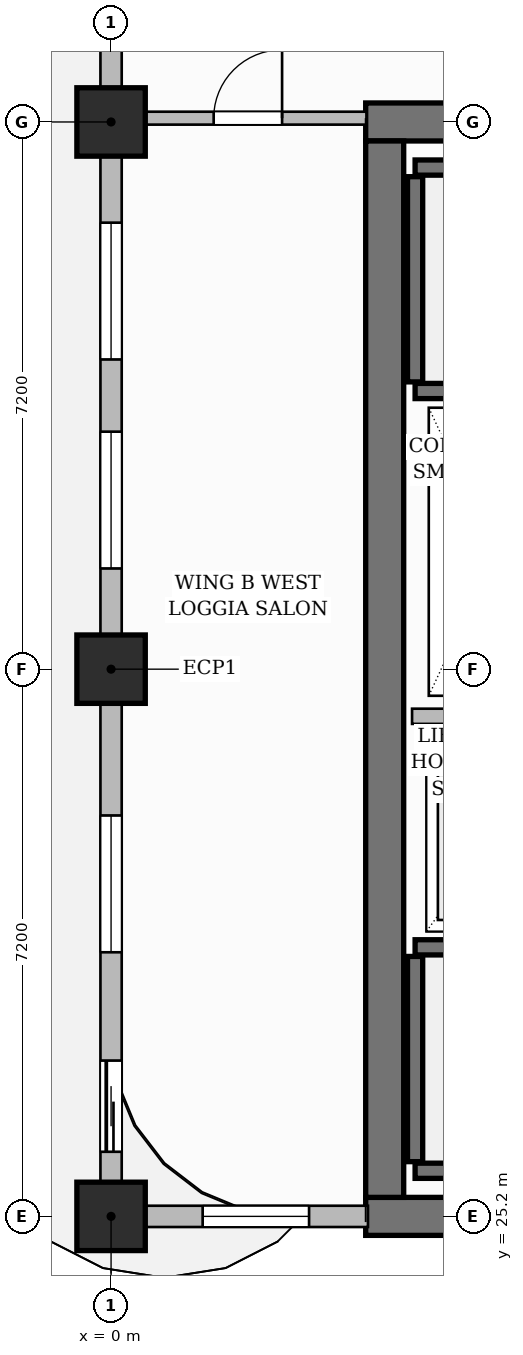
"""IFC4 building model, lengths in metres.
Left out: names, types, materials, properties, quantities, classifications, styles, units other than length and angle.
Written with IfcOpenShell. Run it as: python <this file> out.ifc"""

import sys

from ifc_helpers import new_model, si_unit, direction, frame, frame_2d, origin, origin_2d, place, context, subcontext, project, spatial, rectangle, extrude, source, transform, mapped, element, fill, save


model = new_model("IFC4")
c1 = context("Model", 3, precision=1e-05, world=origin(), true_north=direction((0.0, 1.0)))
c2 = subcontext(c1, "Body", "Model", "MODEL_VIEW")
j1 = project(units=[si_unit("LENGTHUNIT", "METRE"), si_unit("PLANEANGLEUNIT", "RADIAN")], contexts=[c1])
p1 = place(None, origin())
s1 = spatial("IfcSite", under=j1, at=p1, CompositionType="ELEMENT")
p2 = place(p1, origin())
s2 = spatial("IfcBuilding", under=s1, at=p2, CompositionType="ELEMENT")
p3 = place(p2, frame((0.0, 0.0, 205.75)))
s3 = spatial("IfcBuildingStorey", under=s2, at=p3, CompositionType="ELEMENT", Elevation=205.75)
for number, where, z_axis, x_axis in (
    (1, (3.35, 25.2, 0.0), (0.0, 0.0, 1.0), (1.0, 0.0, 0.0)),
    (2, (3.35, 39.6, 0.0), (0.0, 0.0, 1.0), (1.0, 0.0, 0.0)),
):
    element("IfcWall", number, at=place(p3, frame(where, z_axis=z_axis, x_axis=x_axis)), inside=s3, PredefinedType="SHEAR", context=c2, shape_type="SweptSolid", body=[
        extrude(rectangle(XDim=8.3, YDim=0.5, at=frame_2d((4.15, 0.0))), origin(), (0.0, 0.0, 1.0), 3.85),
    ])
p4 = place(p3, frame((3.6, 25.45, 0.0), z_axis=(0.0, 0.0, 1.0), x_axis=(0.0, 1.0, 0.0)))
e3 = element("IfcWall", 3, at=p4, inside=s3, PredefinedType="SHEAR", context=c2, shape_type="SweptSolid", body=[
    extrude(rectangle(XDim=13.9, YDim=0.5, at=frame_2d((6.95, 0.0))), origin(), (0.0, 0.0, 1.0), 3.85),
])
m1 = source(origin(), c2, "Body", "SweptSolid", [
    extrude(rectangle(XDim=0.9, YDim=0.9, at=origin_2d()), origin(), (0.0, 0.0, 1.0), 3.85),
])
for number, where, z_axis, x_axis in (
    (4, (0.0, 25.2, 0.0), (0.0, 0.0, 1.0), (1.0, 0.0, 0.0)),
    (5, (0.0, 32.4, 0.0), (0.0, 0.0, 1.0), (1.0, 0.0, 0.0)),
    (6, (0.0, 39.6, 0.0), (0.0, 0.0, 1.0), (1.0, 0.0, 0.0)),
):
    element("IfcColumn", number, at=place(p3, frame(where, z_axis=z_axis, x_axis=x_axis)), inside=s3, PredefinedType="COLUMN", context=c2, shape_type="MappedRepresentation", body=[
        mapped(m1, transform((0.0, 0.0, 0.0), scale=1.0)),
    ])
p5 = place(p3, frame((4.0, 25.8, 0.0), z_axis=(0.0, 0.0, 1.0), x_axis=(1.0, 0.0, 0.0)))
e7 = element("IfcWall", 7, at=p5, inside=s3, PredefinedType="SHEAR", context=c2, shape_type="SweptSolid", body=[
    extrude(rectangle(XDim=7.1, YDim=0.2, at=frame_2d((3.55, 0.0))), origin(), (0.0, 0.0, 1.0), 3.85),
])
p6 = place(p3, frame((4.0, 25.92, 0.0), z_axis=(0.0, 0.0, 1.0), x_axis=(0.0, 1.0, 0.0)))
e8 = element("IfcWall", 8, at=p6, inside=s3, PredefinedType="SHEAR", context=c2, shape_type="SweptSolid", body=[
    extrude(rectangle(XDim=2.7, YDim=0.2, at=frame_2d((1.35, 0.0))), origin(), (0.0, 0.0, 1.0), 3.85),
])
p7 = place(p3, frame((4.0, 28.74, 0.0), z_axis=(0.0, 0.0, 1.0), x_axis=(1.0, 0.0, 0.0)))
e9 = element("IfcWall", 9, at=p7, inside=s3, PredefinedType="SHEAR", context=c2, shape_type="SweptSolid", body=[
    extrude(rectangle(XDim=7.1, YDim=0.2, at=frame_2d((3.55, 0.0))), origin(), (0.0, 0.0, 1.0), 3.85),
])
p8 = place(p7, frame((5.815, 0.0, 0.0)))
e10 = element("IfcOpeningElement", 10, at=p8, cuts=e9, PredefinedType="OPENING", context=c2, shape_type="SweptSolid", body=[
    extrude(rectangle(XDim=1.05, YDim=2.2, at=frame_2d((0.525, 1.1))), frame((0.0, 0.11, 0.0), z_axis=(0.0, -1.0, 0.0), x_axis=(1.0, 0.0, 0.0)), (0.0, 0.0, 1.0), 0.22),
])
p9 = place(p3, frame((4.0, 39.0, 0.0), z_axis=(0.0, 0.0, 1.0), x_axis=(1.0, 0.0, 0.0)))
e11 = element("IfcWall", 11, at=p9, inside=s3, PredefinedType="SHEAR", context=c2, shape_type="SweptSolid", body=[
    extrude(rectangle(XDim=7.1, YDim=0.2, at=frame_2d((3.55, 0.0))), origin(), (0.0, 0.0, 1.0), 3.85),
])
p10 = place(p3, frame((4.0, 36.18, 0.0), z_axis=(0.0, 0.0, 1.0), x_axis=(0.0, 1.0, 0.0)))
e12 = element("IfcWall", 12, at=p10, inside=s3, PredefinedType="SHEAR", context=c2, shape_type="SweptSolid", body=[
    extrude(rectangle(XDim=2.7, YDim=0.2, at=frame_2d((1.35, 0.0))), origin(), (0.0, 0.0, 1.0), 3.85),
])
p11 = place(p3, frame((4.0, 36.06, 0.0), z_axis=(0.0, 0.0, 1.0), x_axis=(1.0, 0.0, 0.0)))
e13 = element("IfcWall", 13, at=p11, inside=s3, PredefinedType="SHEAR", context=c2, shape_type="SweptSolid", body=[
    extrude(rectangle(XDim=7.1, YDim=0.2, at=frame_2d((3.55, 0.0))), origin(), (0.0, 0.0, 1.0), 3.85),
])
p12 = place(p11, frame((5.815, 0.0, 0.0)))
e14 = element("IfcOpeningElement", 14, at=p12, cuts=e13, PredefinedType="OPENING", context=c2, shape_type="SweptSolid", body=[
    extrude(rectangle(XDim=1.05, YDim=2.2, at=frame_2d((0.525, 1.1))), frame((0.0, 0.11, 0.0), z_axis=(0.0, -1.0, 0.0), x_axis=(1.0, 0.0, 0.0)), (0.0, 0.0, 1.0), 0.22),
])
p13 = place(p3, frame((3.96, 31.78, 0.0), z_axis=(0.0, 0.0, 1.0), x_axis=(1.0, 0.0, 0.0)))
e15 = element("IfcWall", 15, at=p13, inside=s3, PredefinedType="PARTITIONING", context=c2, shape_type="SweptSolid", body=[
    extrude(rectangle(XDim=2.13, YDim=0.2, at=frame_2d((1.065, 0.0))), origin(), (0.0, 0.0, 1.0), 3.6),
])
p14 = place(p3, frame((0.24, 39.65, 0.0), z_axis=(0.0, 0.0, 1.0), x_axis=(1.0, 0.0, 0.0)))
e16 = element("IfcWall", 16, at=p14, inside=s3, PredefinedType="PARTITIONING", context=c2, shape_type="SweptSolid", body=[
    extrude(rectangle(XDim=3.12, YDim=0.17, at=frame_2d((1.56, 0.0))), origin(), (0.0, 0.0, 1.0), 3.6),
])
p15 = place(p14, frame((1.11, 0.0, 0.0)))
e17 = element("IfcOpeningElement", 17, at=p15, cuts=e16, PredefinedType="OPENING", context=c2, shape_type="SweptSolid", body=[
    extrude(rectangle(XDim=0.9, YDim=2.15, at=frame_2d((0.45, 1.075))), frame((0.0, 0.095, 0.0), z_axis=(0.0, -1.0, 0.0), x_axis=(1.0, 0.0, 0.0)), (0.0, 0.0, 1.0), 0.19),
])
p16 = place(p3, frame((0.0, 25.2, 0.0), z_axis=(0.0, 0.0, 1.0), x_axis=(1.0, 0.0, 0.0)))
e18 = element("IfcWall", 18, at=p16, inside=s3, PredefinedType="SOLIDWALL", context=c2, shape_type="SweptSolid", body=[
    extrude(rectangle(XDim=3.38, YDim=0.28, at=frame_2d((1.69, 0.0))), origin(), (0.0, 0.0, 1.0), 3.6),
])
p17 = place(p16, frame((1.205, 0.0, 0.8)))
e19 = element("IfcOpeningElement", 19, at=p17, cuts=e18, PredefinedType="OPENING", context=c2, shape_type="SweptSolid", body=[
    extrude(rectangle(XDim=1.4, YDim=1.85, at=frame_2d((0.7, 0.925))), frame((0.0, 0.15, 0.0), z_axis=(0.0, -1.0, 0.0), x_axis=(1.0, 0.0, 0.0)), (0.0, 0.0, 1.0), 0.3),
])
p18 = place(p3, frame((0.0, 25.25, 0.0), z_axis=(0.0, 0.0, 1.0), x_axis=(0.0, 1.0, 0.0)))
e20 = element("IfcWall", 20, at=p18, inside=s3, PredefinedType="SOLIDWALL", context=c2, shape_type="SweptSolid", body=[
    extrude(rectangle(XDim=21.5, YDim=0.28, at=frame_2d((10.75, 0.0))), origin(), (0.0, 0.0, 1.0), 3.085),
])
p19 = place(p18, frame((18.357, 0.0, 0.0)))
e21 = element("IfcOpeningElement", 21, at=p19, cuts=e20, PredefinedType="OPENING", context=c2, shape_type="SweptSolid", body=[
    extrude(rectangle(XDim=1.2, YDim=2.2, at=frame_2d((0.6, 1.1))), frame((0.0, 0.15, 0.0), z_axis=(0.0, -1.0, 0.0), x_axis=(1.0, 0.0, 0.0)), (0.0, 0.0, 1.0), 0.3),
])
p20 = place(p18, frame((0.8, 0.0, 0.0)))
e22 = element("IfcOpeningElement", 22, at=p20, cuts=e20, PredefinedType="OPENING", context=c2, shape_type="SweptSolid", body=[
    extrude(rectangle(XDim=1.2, YDim=2.2, at=frame_2d((0.6, 1.1))), frame((0.0, 0.15, 0.0), z_axis=(0.0, -1.0, 0.0), x_axis=(1.0, 0.0, 0.0)), (0.0, 0.0, 1.0), 0.3),
])
p21 = place(p18, frame((3.425, 0.0, 0.8)))
e23 = element("IfcOpeningElement", 23, at=p21, cuts=e20, PredefinedType="OPENING", context=c2, shape_type="SweptSolid", body=[
    extrude(rectangle(XDim=1.8, YDim=1.85, at=frame_2d((0.9, 0.925))), frame((0.0, 0.15, 0.0), z_axis=(0.0, -1.0, 0.0), x_axis=(1.0, 0.0, 0.0)), (0.0, 0.0, 1.0), 0.3),
])
p22 = place(p18, frame((8.475, 0.0, 0.8)))
e24 = element("IfcOpeningElement", 24, at=p22, cuts=e20, PredefinedType="OPENING", context=c2, shape_type="SweptSolid", body=[
    extrude(rectangle(XDim=1.8, YDim=1.85, at=frame_2d((0.9, 0.925))), frame((0.0, 0.15, 0.0), z_axis=(0.0, -1.0, 0.0), x_axis=(1.0, 0.0, 0.0)), (0.0, 0.0, 1.0), 0.3),
])
p23 = place(p18, frame((11.225, 0.0, 0.8)))
e25 = element("IfcOpeningElement", 25, at=p23, cuts=e20, PredefinedType="OPENING", context=c2, shape_type="SweptSolid", body=[
    extrude(rectangle(XDim=1.8, YDim=1.85, at=frame_2d((0.9, 0.925))), frame((0.0, 0.15, 0.0), z_axis=(0.0, -1.0, 0.0), x_axis=(1.0, 0.0, 0.0)), (0.0, 0.0, 1.0), 0.3),
])
p24 = place(p18, frame((16.632, 0.0, 0.8)))
e26 = element("IfcOpeningElement", 26, at=p24, cuts=e20, PredefinedType="OPENING", context=c2, shape_type="SweptSolid", body=[
    extrude(rectangle(XDim=1.15, YDim=1.8, at=frame_2d((0.575, 0.9))), frame((0.0, 0.15, 0.0), z_axis=(0.0, -1.0, 0.0), x_axis=(1.0, 0.0, 0.0)), (0.0, 0.0, 1.0), 0.3),
])
m2 = source(origin(), c2, "Body", "SweptSolid", [
    extrude(rectangle(XDim=0.9, YDim=2.15, at=frame_2d((0.45, 1.075))), frame((0.0, 0.025, 0.0), z_axis=(0.0, -1.0, 0.0), x_axis=(1.0, 0.0, 0.0)), (0.0, 0.0, 1.0), 0.05),
])
p25 = place(p15, origin())
e27 = element("IfcDoor", 27, at=p25, inside=s3, OperationType="SINGLE_SWING_RIGHT", PredefinedType="DOOR", context=c2, shape_type="MappedRepresentation", body=[
    mapped(m2, transform((0.0, 0.0, 0.0), scale=1.0)),
])
fill(e17, e27)
m3 = source(origin(), c2, "Body", "SweptSolid", [
    extrude(rectangle(XDim=1.2, YDim=2.2, at=frame_2d((0.6, 1.1))), frame((0.0, 0.025, 0.0), z_axis=(0.0, -1.0, 0.0), x_axis=(1.0, 0.0, 0.0)), (0.0, 0.0, 1.0), 0.05),
])
p26 = place(p20, origin())
e28 = element("IfcDoor", 28, at=p26, inside=s3, OperationType="SLIDING_TO_LEFT", PredefinedType="DOOR", context=c2, shape_type="MappedRepresentation", body=[
    mapped(m3, transform((0.0, 0.0, 0.0), scale=1.0)),
])
fill(e22, e28)
m4 = source(origin(), c2, "Body", "SweptSolid", [
    extrude(rectangle(XDim=1.4, YDim=1.85, at=frame_2d((0.7, 0.925))), frame((0.0, 0.03, 0.0), z_axis=(0.0, -1.0, 0.0), x_axis=(1.0, 0.0, 0.0)), (0.0, 0.0, 1.0), 0.06),
])
p27 = place(p17, origin())
e29 = element("IfcWindow", 29, at=p27, inside=s3, PartitioningType="SINGLE_PANEL", PredefinedType="WINDOW", context=c2, shape_type="MappedRepresentation", body=[
    mapped(m4, transform((0.0, 0.0, 0.0), scale=1.0)),
])
fill(e19, e29)
m5 = source(origin(), c2, "Body", "SweptSolid", [
    extrude(rectangle(XDim=1.8, YDim=1.85, at=frame_2d((0.9, 0.925))), frame((0.0, 0.03, 0.0), z_axis=(0.0, -1.0, 0.0), x_axis=(1.0, 0.0, 0.0)), (0.0, 0.0, 1.0), 0.06),
])
p28 = place(p21, origin())
e30 = element("IfcWindow", 30, at=p28, inside=s3, PartitioningType="DOUBLE_PANEL_VERTICAL", PredefinedType="WINDOW", context=c2, shape_type="MappedRepresentation", body=[
    mapped(m5, transform((0.0, 0.0, 0.0), scale=1.0)),
])
fill(e23, e30)
p29 = place(p22, origin())
e31 = element("IfcWindow", 31, at=p29, inside=s3, PartitioningType="DOUBLE_PANEL_VERTICAL", PredefinedType="WINDOW", context=c2, shape_type="MappedRepresentation", body=[
    mapped(m5, transform((0.0, 0.0, 0.0), scale=1.0)),
])
fill(e24, e31)
p30 = place(p23, origin())
e32 = element("IfcWindow", 32, at=p30, inside=s3, PartitioningType="DOUBLE_PANEL_VERTICAL", PredefinedType="WINDOW", context=c2, shape_type="MappedRepresentation", body=[
    mapped(m5, transform((0.0, 0.0, 0.0), scale=1.0)),
])
fill(e25, e32)
save(model, sys.argv[1])
